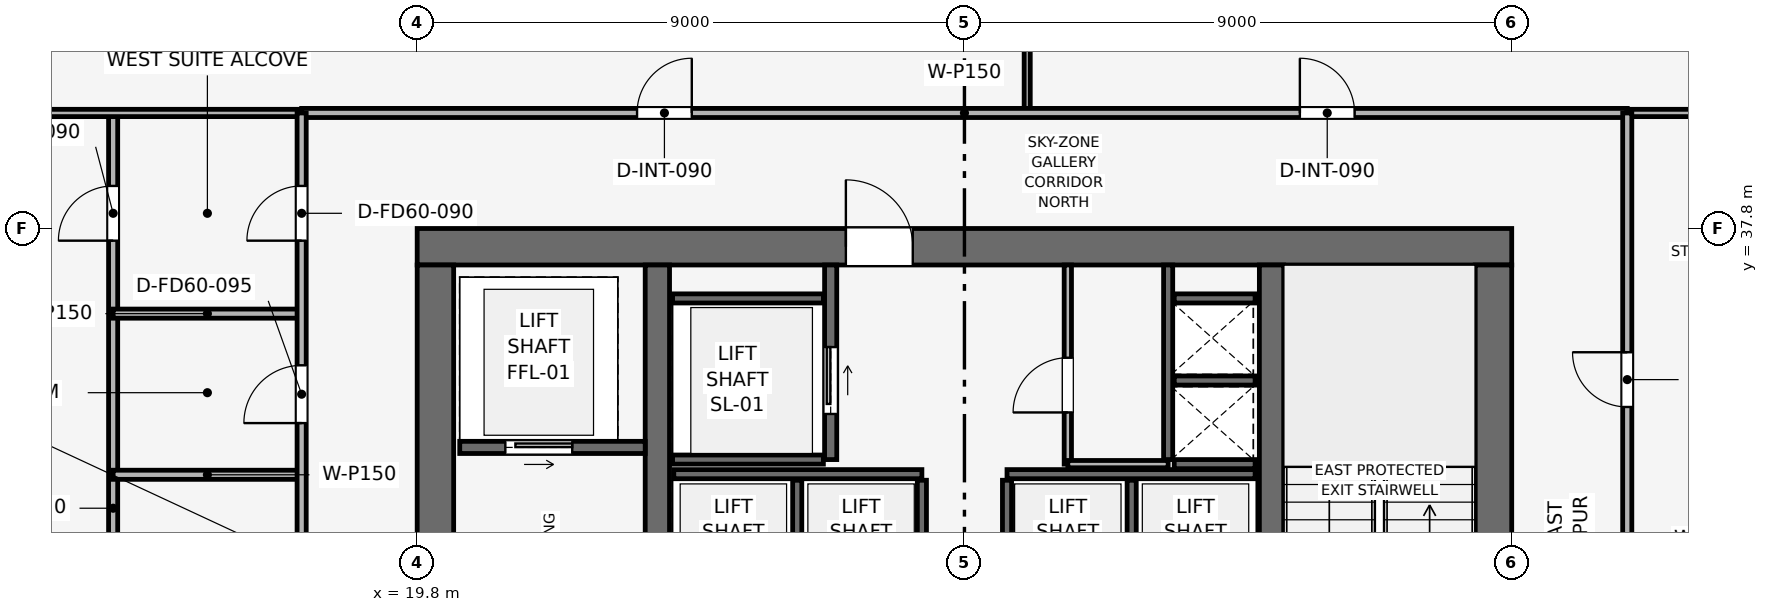
"""IFC4 building model, lengths in metres.
Left out: names, types, materials, properties, quantities, classifications, styles, units other than length and angle.
Written with IfcOpenShell. Run it as: python <this file> out.ifc"""

import sys

from ifc_helpers import new_model, si_unit, direction, frame, frame_2d, origin, place, context, subcontext, project, spatial, rectangle, extrude, element, fill, save


model = new_model("IFC4")
c1 = context("Model", 3, precision=1e-05, world=origin(), true_north=direction((0.0, 1.0)))
c2 = subcontext(c1, "Body", "Model", "MODEL_VIEW")
j1 = project(units=[si_unit("LENGTHUNIT", "METRE"), si_unit("PLANEANGLEUNIT", "RADIAN")], contexts=[c1])
p1 = place(None, origin())
s1 = spatial("IfcSite", under=j1, at=p1, CompositionType="ELEMENT")
p2 = place(p1, origin())
s2 = spatial("IfcBuilding", under=s1, at=p2, CompositionType="ELEMENT")
p3 = place(p2, frame((0.0, 0.0, 360.0)))
s3 = spatial("IfcBuildingStorey", under=s2, at=p3, CompositionType="ELEMENT", Elevation=360.0)
p4 = place(p3, frame((19.8, 37.5, 0.0), z_axis=(0.0, 0.0, 1.0), x_axis=(1.0, 0.0, 0.0)))
e1 = element("IfcWall", 1, at=p4, inside=s3, PredefinedType="SHEAR", context=c2, shape_type="SweptSolid", body=[
    extrude(rectangle(XDim=18.0, YDim=0.6, at=frame_2d((9.0, 0.0))), origin(), (0.0, 0.0, 1.0), 4.5),
])
p5 = place(p4, frame((7.05, 0.0, 0.0)))
e2 = element("IfcOpeningElement", 2, at=p5, cuts=e1, PredefinedType="OPENING", context=c2, shape_type="SweptSolid", body=[
    extrude(rectangle(XDim=1.1, YDim=2.15, at=frame_2d((0.55, 1.075))), frame((0.0, 0.31, 0.0), z_axis=(0.0, -1.0, 0.0), x_axis=(1.0, 0.0, 0.0)), (0.0, 0.0, 1.0), 0.62),
])
p6 = place(p3, frame((20.1, 20.4, 0.0), z_axis=(0.0, 0.0, 1.0), x_axis=(0.0, 1.0, 0.0)))
e3 = element("IfcWall", 3, at=p6, inside=s3, PredefinedType="SHEAR", context=c2, shape_type="SweptSolid", body=[
    extrude(rectangle(XDim=16.8, YDim=0.6, at=frame_2d((8.4, 0.0))), origin(), (0.0, 0.0, 1.0), 4.5),
])
p7 = place(p6, frame((10.4, 0.0, 0.0)))
e4 = element("IfcOpeningElement", 4, at=p7, cuts=e3, PredefinedType="OPENING", context=c2, shape_type="SweptSolid", body=[
    extrude(rectangle(XDim=1.1, YDim=2.15, at=frame_2d((0.55, 1.075))), frame((0.0, 0.31, 0.0), z_axis=(0.0, -1.0, 0.0), x_axis=(1.0, 0.0, 0.0)), (0.0, 0.0, 1.0), 0.62),
])
p8 = place(p3, frame((37.5, 20.4, 0.0), z_axis=(0.0, 0.0, 1.0), x_axis=(0.0, 1.0, 0.0)))
e5 = element("IfcWall", 5, at=p8, inside=s3, PredefinedType="SHEAR", context=c2, shape_type="SweptSolid", body=[
    extrude(rectangle(XDim=16.8, YDim=0.6, at=frame_2d((8.4, 0.0))), origin(), (0.0, 0.0, 1.0), 4.5),
])
p9 = place(p8, frame((4.9, 0.0, 0.0)))
e6 = element("IfcOpeningElement", 6, at=p9, cuts=e5, PredefinedType="OPENING", context=c2, shape_type="SweptSolid", body=[
    extrude(rectangle(XDim=1.1, YDim=2.15, at=frame_2d((0.55, 1.075))), frame((0.0, 0.31, 0.0), z_axis=(0.0, -1.0, 0.0), x_axis=(1.0, 0.0, 0.0)), (0.0, 0.0, 1.0), 0.62),
])
for number, where, z_axis, x_axis in (
    (7, (23.75, 20.4, 0.0), (0.0, 0.0, 1.0), (0.0, 1.0, 0.0)),
    (8, (33.85, 20.4, 0.0), (0.0, 0.0, 1.0), (0.0, 1.0, 0.0)),
):
    element("IfcWall", number, at=place(p3, frame(where, z_axis=z_axis, x_axis=x_axis)), inside=s3, PredefinedType="SHEAR", context=c2, shape_type="SweptSolid", body=[
        extrude(rectangle(XDim=16.8, YDim=0.4, at=frame_2d((8.4, 0.0))), origin(), (0.0, 0.0, 1.0), 4.5),
    ])
p10 = place(p3, frame((32.15, 34.0, 0.0), z_axis=(0.0, 0.0, 1.0), x_axis=(0.0, 1.0, 0.0)))
e9 = element("IfcWall", 9, at=p10, inside=s3, PredefinedType="SHEAR", context=c2, shape_type="SweptSolid", body=[
    extrude(rectangle(XDim=3.2, YDim=0.15, at=frame_2d((1.6, 0.0))), origin(), (0.0, 0.0, 1.0), 4.24),
])
for number, where, z_axis, x_axis in (
    (10, (32.25, 33.925, 0.0), (0.0, 0.0, 1.0), (1.0, 0.0, 0.0)),
    (11, (32.25, 35.3, 0.0), (0.0, 0.0, 1.0), (1.0, 0.0, 0.0)),
):
    element("IfcWall", number, at=place(p3, frame(where, z_axis=z_axis, x_axis=x_axis)), inside=s3, PredefinedType="SHEAR", context=c2, shape_type="SweptSolid", body=[
        extrude(rectangle(XDim=1.33, YDim=0.15, at=frame_2d((0.665, 0.0))), origin(), (0.0, 0.0, 1.0), 4.24),
    ])
p11 = place(p3, frame((20.5, 34.2, 0.0), z_axis=(0.0, 0.0, 1.0), x_axis=(1.0, 0.0, 0.0)))
e12 = element("IfcWall", 12, at=p11, inside=s3, PredefinedType="SHEAR", context=c2, shape_type="SweptSolid", body=[
    extrude(rectangle(XDim=3.05, YDim=0.2, at=frame_2d((1.525, 0.0))), origin(), (0.0, 0.0, 1.0), 4.24),
])
p12 = place(p11, frame((0.75, 0.0, 0.0)))
e13 = element("IfcOpeningElement", 13, at=p12, cuts=e12, PredefinedType="OPENING", context=c2, shape_type="SweptSolid", body=[
    extrude(rectangle(XDim=1.1, YDim=2.15, at=frame_2d((0.55, 1.075))), frame((0.0, 0.11, 0.0), z_axis=(0.0, -1.0, 0.0), x_axis=(1.0, 0.0, 0.0)), (0.0, 0.0, 1.0), 0.22),
])
p13 = place(p3, frame((26.6, 34.0, 0.0), z_axis=(0.0, 0.0, 1.0), x_axis=(0.0, 1.0, 0.0)))
e14 = element("IfcWall", 14, at=p13, inside=s3, PredefinedType="SHEAR", context=c2, shape_type="SweptSolid", body=[
    extrude(rectangle(XDim=3.2, YDim=0.2, at=frame_2d((1.6, 0.0))), origin(), (0.0, 0.0, 1.0), 4.24),
])
p14 = place(p13, frame((0.75, 0.0, 0.0)))
e15 = element("IfcOpeningElement", 15, at=p14, cuts=e14, PredefinedType="OPENING", context=c2, shape_type="SweptSolid", body=[
    extrude(rectangle(XDim=1.1, YDim=2.15, at=frame_2d((0.55, 1.075))), frame((0.0, 0.11, 0.0), z_axis=(0.0, -1.0, 0.0), x_axis=(1.0, 0.0, 0.0)), (0.0, 0.0, 1.0), 0.22),
])
for number, where, z_axis, x_axis in (
    (16, (24.0, 34.0, 0.0), (0.0, 0.0, 1.0), (1.0, 0.0, 0.0)),
    (17, (24.0, 36.65, 0.0), (0.0, 0.0, 1.0), (1.0, 0.0, 0.0)),
):
    element("IfcWall", number, at=place(p3, frame(where, z_axis=z_axis, x_axis=x_axis)), inside=s3, PredefinedType="SHEAR", context=c2, shape_type="SweptSolid", body=[
        extrude(rectangle(XDim=2.48, YDim=0.15, at=frame_2d((1.24, 0.0))), origin(), (0.0, 0.0, 1.0), 4.24),
    ])
p15 = place(p3, frame((32.25, 36.65, 0.0), z_axis=(0.0, 0.0, 1.0), x_axis=(1.0, 0.0, 0.0)))
e18 = element("IfcWall", 18, at=p15, inside=s3, PredefinedType="SHEAR", context=c2, shape_type="SweptSolid", body=[
    extrude(rectangle(XDim=1.33, YDim=0.15, at=frame_2d((0.665, 0.0))), origin(), (0.0, 0.0, 1.0), 4.24),
])
for number, where, z_axis, x_axis in (
    (19, (24.02, 33.76, 0.0), (0.0, 0.0, 1.0), (1.0, 0.0, 0.0)),
    (20, (29.5, 33.76, 0.0), (0.0, 0.0, 1.0), (1.0, 0.0, 0.0)),
):
    element("IfcWall", number, at=place(p3, frame(where, z_axis=z_axis, x_axis=x_axis)), inside=s3, PredefinedType="SHEAR", context=c2, shape_type="SweptSolid", body=[
        extrude(rectangle(XDim=4.08, YDim=0.15, at=frame_2d((2.04, 0.0))), origin(), (0.0, 0.0, 1.0), 4.24),
    ])
for number, where, z_axis, x_axis in (
    (21, (26.05, 31.42, 0.0), (0.0, 0.0, 1.0), (0.0, 1.0, 0.0)),
    (22, (28.1, 31.42, 0.0), (0.0, 0.0, 1.0), (0.0, 1.0, 0.0)),
    (23, (29.5, 31.42, 0.0), (0.0, 0.0, 1.0), (0.0, 1.0, 0.0)),
    (24, (31.55, 31.42, 0.0), (0.0, 0.0, 1.0), (0.0, 1.0, 0.0)),
):
    element("IfcWall", number, at=place(p3, frame(where, z_axis=z_axis, x_axis=x_axis)), inside=s3, PredefinedType="SHEAR", context=c2, shape_type="SweptSolid", body=[
        extrude(rectangle(XDim=2.24, YDim=0.15, at=frame_2d((1.12, 0.0))), origin(), (0.0, 0.0, 1.0), 4.24),
    ])
p16 = place(p3, frame((30.5, 33.925, 0.0), z_axis=(0.0, 0.0, 1.0), x_axis=(0.0, 1.0, 0.0)))
e25 = element("IfcWall", 25, at=p16, inside=s3, PredefinedType="PARTITIONING", context=c2, shape_type="SweptSolid", body=[
    extrude(rectangle(XDim=3.275, YDim=0.12, at=frame_2d((1.637, 0.0))), origin(), (0.0, 0.0, 1.0), 4.24),
])
p17 = place(p16, frame((0.85, 0.0, 0.0)))
e26 = element("IfcOpeningElement", 26, at=p17, cuts=e25, PredefinedType="OPENING", context=c2, shape_type="SweptSolid", body=[
    extrude(rectangle(XDim=0.9, YDim=2.1, at=frame_2d((0.45, 1.05))), frame((0.0, 0.07, 0.0), z_axis=(0.0, -1.0, 0.0), x_axis=(1.0, 0.0, 0.0)), (0.0, 0.0, 1.0), 0.14),
])
p18 = place(p3, frame((30.5, 33.925, 0.0), z_axis=(0.0, 0.0, 1.0), x_axis=(1.0, 0.0, 0.0)))
e27 = element("IfcWall", 27, at=p18, inside=s3, PredefinedType="PARTITIONING", context=c2, shape_type="SweptSolid", body=[
    extrude(rectangle(XDim=1.65, YDim=0.12, at=frame_2d((0.825, 0.0))), origin(), (0.0, 0.0, 1.0), 4.24),
])
p19 = place(p3, frame((29.832, 39.7, 0.0), z_axis=(0.0, 0.0, 1.0), x_axis=(0.0, 1.0, 0.0)))
e28 = element("IfcWall", 28, at=p19, inside=s3, PredefinedType="MOVABLE", context=c2, shape_type="SweptSolid", body=[
    extrude(rectangle(XDim=9.37, YDim=0.1, at=frame_2d((4.685, 0.0))), origin(), (0.0, 0.0, 1.0), 3.865),
])
p20 = place(p3, frame((14.8, 28.0, 0.0), z_axis=(0.0, 0.0, 1.0), x_axis=(0.0, 1.0, 0.0)))
e29 = element("IfcWall", 29, at=p20, inside=s3, PredefinedType="PARTITIONING", context=c2, shape_type="SweptSolid", body=[
    extrude(rectangle(XDim=11.7, YDim=0.15, at=frame_2d((5.85, 0.0))), origin(), (0.0, 0.0, 1.0), 3.825),
])
p21 = place(p20, frame((9.6, 0.0, 0.0)))
e30 = element("IfcOpeningElement", 30, at=p21, cuts=e29, PredefinedType="OPENING", context=c2, shape_type="SweptSolid", body=[
    extrude(rectangle(XDim=0.9, YDim=2.1, at=frame_2d((0.45, 1.05))), frame((0.0, 0.085, 0.0), z_axis=(0.0, -1.0, 0.0), x_axis=(1.0, 0.0, 0.0)), (0.0, 0.0, 1.0), 0.17),
])
for number, where, z_axis, x_axis in (
    (31, (14.8, 36.4, 0.0), (0.0, 0.0, 1.0), (1.0, 0.0, 0.0)),
    (32, (14.8, 33.75, 0.0), (0.0, 0.0, 1.0), (1.0, 0.0, 0.0)),
):
    element("IfcWall", number, at=place(p3, frame(where, z_axis=z_axis, x_axis=x_axis)), inside=s3, PredefinedType="PARTITIONING", context=c2, shape_type="SweptSolid", body=[
        extrude(rectangle(XDim=3.1, YDim=0.15, at=frame_2d((1.55, 0.0))), origin(), (0.0, 0.0, 1.0), 3.865),
    ])
p22 = place(p3, frame((8.53, 39.7, 0.0), z_axis=(0.0, 0.0, 1.0), x_axis=(1.0, 0.0, 0.0)))
e33 = element("IfcWall", 33, at=p22, inside=s3, PredefinedType="PARTITIONING", context=c2, shape_type="SweptSolid", body=[
    extrude(rectangle(XDim=9.37, YDim=0.12, at=frame_2d((4.685, 0.0))), origin(), (0.0, 0.0, 1.0), 3.825),
])
p23 = place(p3, frame((39.7, 39.7, 0.0), z_axis=(0.0, 0.0, 1.0), x_axis=(1.0, 0.0, 0.0)))
e34 = element("IfcWall", 34, at=p23, inside=s3, PredefinedType="PARTITIONING", context=c2, shape_type="SweptSolid", body=[
    extrude(rectangle(XDim=9.37, YDim=0.12, at=frame_2d((4.685, 0.0))), origin(), (0.0, 0.0, 1.0), 3.825),
])
p24 = place(p3, frame((17.9, 39.7, 0.0), z_axis=(0.0, 0.0, 1.0), x_axis=(1.0, 0.0, 0.0)))
e35 = element("IfcWall", 35, at=p24, inside=s3, PredefinedType="PARTITIONING", context=c2, shape_type="SweptSolid", body=[
    extrude(rectangle(XDim=21.8, YDim=0.15, at=frame_2d((10.9, 0.0))), origin(), (0.0, 0.0, 1.0), 3.825),
])
p25 = place(p24, frame((5.516, 0.0, 0.0)))
e36 = element("IfcOpeningElement", 36, at=p25, cuts=e35, PredefinedType="OPENING", context=c2, shape_type="SweptSolid", body=[
    extrude(rectangle(XDim=0.9, YDim=2.1, at=frame_2d((0.45, 1.05))), frame((0.0, 0.085, 0.0), z_axis=(0.0, -1.0, 0.0), x_axis=(1.0, 0.0, 0.0)), (0.0, 0.0, 1.0), 0.17),
])
p26 = place(p24, frame((16.416, 0.0, 0.0)))
e37 = element("IfcOpeningElement", 37, at=p26, cuts=e35, PredefinedType="OPENING", context=c2, shape_type="SweptSolid", body=[
    extrude(rectangle(XDim=0.9, YDim=2.1, at=frame_2d((0.45, 1.05))), frame((0.0, 0.085, 0.0), z_axis=(0.0, -1.0, 0.0), x_axis=(1.0, 0.0, 0.0)), (0.0, 0.0, 1.0), 0.17),
])
p27 = place(p3, frame((17.9, 14.0, 0.0), z_axis=(0.0, 0.0, 1.0), x_axis=(0.0, 1.0, 0.0)))
e38 = element("IfcWall", 38, at=p27, inside=s3, PredefinedType="PARTITIONING", context=c2, shape_type="SweptSolid", body=[
    extrude(rectangle(XDim=25.7, YDim=0.15, at=frame_2d((12.85, 0.0))), origin(), (0.0, 0.0, 1.0), 3.825),
])
p28 = place(p27, frame((6.55, 0.0, 0.0)))
e39 = element("IfcOpeningElement", 39, at=p28, cuts=e38, PredefinedType="OPENING", context=c2, shape_type="SweptSolid", body=[
    extrude(rectangle(XDim=0.9, YDim=2.1, at=frame_2d((0.45, 1.05))), frame((0.0, 0.085, 0.0), z_axis=(0.0, -1.0, 0.0), x_axis=(1.0, 0.0, 0.0)), (0.0, 0.0, 1.0), 0.17),
])
p29 = place(p27, frame((14.95, 0.0, 0.0)))
e40 = element("IfcOpeningElement", 40, at=p29, cuts=e38, PredefinedType="OPENING", context=c2, shape_type="SweptSolid", body=[
    extrude(rectangle(XDim=0.9, YDim=2.1, at=frame_2d((0.45, 1.05))), frame((0.0, 0.085, 0.0), z_axis=(0.0, -1.0, 0.0), x_axis=(1.0, 0.0, 0.0)), (0.0, 0.0, 1.0), 0.17),
])
p30 = place(p27, frame((17.85, 0.0, 0.0)))
e41 = element("IfcOpeningElement", 41, at=p30, cuts=e38, PredefinedType="OPENING", context=c2, shape_type="SweptSolid", body=[
    extrude(rectangle(XDim=0.9, YDim=2.1, at=frame_2d((0.45, 1.05))), frame((0.0, 0.085, 0.0), z_axis=(0.0, -1.0, 0.0), x_axis=(1.0, 0.0, 0.0)), (0.0, 0.0, 1.0), 0.17),
])
p31 = place(p27, frame((20.6, 0.0, 0.0)))
e42 = element("IfcOpeningElement", 42, at=p31, cuts=e38, PredefinedType="OPENING", context=c2, shape_type="SweptSolid", body=[
    extrude(rectangle(XDim=0.95, YDim=2.1, at=frame_2d((0.475, 1.05))), frame((0.0, 0.085, 0.0), z_axis=(0.0, -1.0, 0.0), x_axis=(1.0, 0.0, 0.0)), (0.0, 0.0, 1.0), 0.17),
])
p32 = place(p27, frame((23.6, 0.0, 0.0)))
e43 = element("IfcOpeningElement", 43, at=p32, cuts=e38, PredefinedType="OPENING", context=c2, shape_type="SweptSolid", body=[
    extrude(rectangle(XDim=0.9, YDim=2.1, at=frame_2d((0.45, 1.05))), frame((0.0, 0.085, 0.0), z_axis=(0.0, -1.0, 0.0), x_axis=(1.0, 0.0, 0.0)), (0.0, 0.0, 1.0), 0.17),
])
p33 = place(p3, frame((39.7, 24.4, 0.0), z_axis=(0.0, 0.0, 1.0), x_axis=(0.0, 1.0, 0.0)))
e44 = element("IfcWall", 44, at=p33, inside=s3, PredefinedType="PARTITIONING", context=c2, shape_type="SweptSolid", body=[
    extrude(rectangle(XDim=15.3, YDim=0.15, at=frame_2d((7.65, 0.0))), origin(), (0.0, 0.0, 1.0), 3.825),
])
p34 = place(p33, frame((0.7, 0.0, 0.0)))
e45 = element("IfcOpeningElement", 45, at=p34, cuts=e44, PredefinedType="OPENING", context=c2, shape_type="SweptSolid", body=[
    extrude(rectangle(XDim=0.9, YDim=2.1, at=frame_2d((0.45, 1.05))), frame((0.0, 0.085, 0.0), z_axis=(0.0, -1.0, 0.0), x_axis=(1.0, 0.0, 0.0)), (0.0, 0.0, 1.0), 0.17),
])
p35 = place(p33, frame((3.966, 0.0, 0.0)))
e46 = element("IfcOpeningElement", 46, at=p35, cuts=e44, PredefinedType="OPENING", context=c2, shape_type="SweptSolid", body=[
    extrude(rectangle(XDim=0.9, YDim=2.1, at=frame_2d((0.45, 1.05))), frame((0.0, 0.085, 0.0), z_axis=(0.0, -1.0, 0.0), x_axis=(1.0, 0.0, 0.0)), (0.0, 0.0, 1.0), 0.17),
])
p36 = place(p33, frame((10.465, 0.0, 0.0)))
e47 = element("IfcOpeningElement", 47, at=p36, cuts=e44, PredefinedType="OPENING", context=c2, shape_type="SweptSolid", body=[
    extrude(rectangle(XDim=0.9, YDim=2.1, at=frame_2d((0.45, 1.05))), frame((0.0, 0.085, 0.0), z_axis=(0.0, -1.0, 0.0), x_axis=(1.0, 0.0, 0.0)), (0.0, 0.0, 1.0), 0.17),
])
p37 = place(p12, origin())
e48 = element("IfcDoor", 48, at=p37, inside=s3, OperationType="SLIDING_TO_RIGHT", PredefinedType="DOOR", context=c2, shape_type="SweptSolid", body=[
    extrude(rectangle(XDim=1.1, YDim=2.15, at=frame_2d((0.55, 1.075))), frame((0.0, 0.025, 0.0), z_axis=(0.0, -1.0, 0.0), x_axis=(1.0, 0.0, 0.0)), (0.0, 0.0, 1.0), 0.05),
])
fill(e13, e48)
p38 = place(p14, origin())
e49 = element("IfcDoor", 49, at=p38, inside=s3, OperationType="SLIDING_TO_RIGHT", PredefinedType="DOOR", context=c2, shape_type="SweptSolid", body=[
    extrude(rectangle(XDim=1.1, YDim=2.15, at=frame_2d((0.55, 1.075))), frame((0.0, 0.025, 0.0), z_axis=(0.0, -1.0, 0.0), x_axis=(1.0, 0.0, 0.0)), (0.0, 0.0, 1.0), 0.05),
])
fill(e15, e49)
p39 = place(p17, origin())
e50 = element("IfcDoor", 50, at=p39, inside=s3, OperationType="SINGLE_SWING_LEFT", PredefinedType="DOOR", context=c2, shape_type="SweptSolid", body=[
    extrude(rectangle(XDim=0.9, YDim=2.1, at=frame_2d((0.45, 1.05))), frame((0.0, 0.025, 0.0), z_axis=(0.0, -1.0, 0.0), x_axis=(1.0, 0.0, 0.0)), (0.0, 0.0, 1.0), 0.05),
])
fill(e26, e50)
p40 = place(p21, origin())
e51 = element("IfcDoor", 51, at=p40, inside=s3, OperationType="SINGLE_SWING_LEFT", PredefinedType="DOOR", context=c2, shape_type="SweptSolid", body=[
    extrude(rectangle(XDim=0.9, YDim=2.1, at=frame_2d((0.45, 1.05))), frame((0.0, 0.025, 0.0), z_axis=(0.0, -1.0, 0.0), x_axis=(1.0, 0.0, 0.0)), (0.0, 0.0, 1.0), 0.05),
])
fill(e30, e51)
p41 = place(p25, origin())
e52 = element("IfcDoor", 52, at=p41, inside=s3, OperationType="SINGLE_SWING_RIGHT", PredefinedType="DOOR", context=c2, shape_type="SweptSolid", body=[
    extrude(rectangle(XDim=0.9, YDim=2.1, at=frame_2d((0.45, 1.05))), frame((0.0, 0.025, 0.0), z_axis=(0.0, -1.0, 0.0), x_axis=(1.0, 0.0, 0.0)), (0.0, 0.0, 1.0), 0.05),
])
fill(e36, e52)
p42 = place(p26, origin())
e53 = element("IfcDoor", 53, at=p42, inside=s3, OperationType="SINGLE_SWING_LEFT", PredefinedType="DOOR", context=c2, shape_type="SweptSolid", body=[
    extrude(rectangle(XDim=0.9, YDim=2.1, at=frame_2d((0.45, 1.05))), frame((0.0, 0.025, 0.0), z_axis=(0.0, -1.0, 0.0), x_axis=(1.0, 0.0, 0.0)), (0.0, 0.0, 1.0), 0.05),
])
fill(e37, e53)
p43 = place(p31, origin())
e54 = element("IfcDoor", 54, at=p43, inside=s3, OperationType="SINGLE_SWING_LEFT", PredefinedType="DOOR", context=c2, shape_type="SweptSolid", body=[
    extrude(rectangle(XDim=0.95, YDim=2.1, at=frame_2d((0.475, 1.05))), frame((0.0, 0.025, 0.0), z_axis=(0.0, -1.0, 0.0), x_axis=(1.0, 0.0, 0.0)), (0.0, 0.0, 1.0), 0.05),
])
fill(e42, e54)
p44 = place(p32, origin())
e55 = element("IfcDoor", 55, at=p44, inside=s3, OperationType="SINGLE_SWING_LEFT", PredefinedType="DOOR", context=c2, shape_type="SweptSolid", body=[
    extrude(rectangle(XDim=0.9, YDim=2.1, at=frame_2d((0.45, 1.05))), frame((0.0, 0.025, 0.0), z_axis=(0.0, -1.0, 0.0), x_axis=(1.0, 0.0, 0.0)), (0.0, 0.0, 1.0), 0.05),
])
fill(e43, e55)
p45 = place(p36, origin())
e56 = element("IfcDoor", 56, at=p45, inside=s3, OperationType="SINGLE_SWING_RIGHT", PredefinedType="DOOR", context=c2, shape_type="SweptSolid", body=[
    extrude(rectangle(XDim=0.9, YDim=2.1, at=frame_2d((0.45, 1.05))), frame((0.0, 0.025, 0.0), z_axis=(0.0, -1.0, 0.0), x_axis=(1.0, 0.0, 0.0)), (0.0, 0.0, 1.0), 0.05),
])
fill(e47, e56)
p46 = place(p5, origin())
e57 = element("IfcDoor", 57, at=p46, inside=s3, OperationType="SINGLE_SWING_LEFT", PredefinedType="DOOR", context=c2, shape_type="SweptSolid", body=[
    extrude(rectangle(XDim=1.1, YDim=2.15, at=frame_2d((0.55, 1.075))), frame((0.0, 0.025, 0.0), z_axis=(0.0, -1.0, 0.0), x_axis=(1.0, 0.0, 0.0)), (0.0, 0.0, 1.0), 0.05),
])
fill(e2, e57)
save(model, sys.argv[1])
